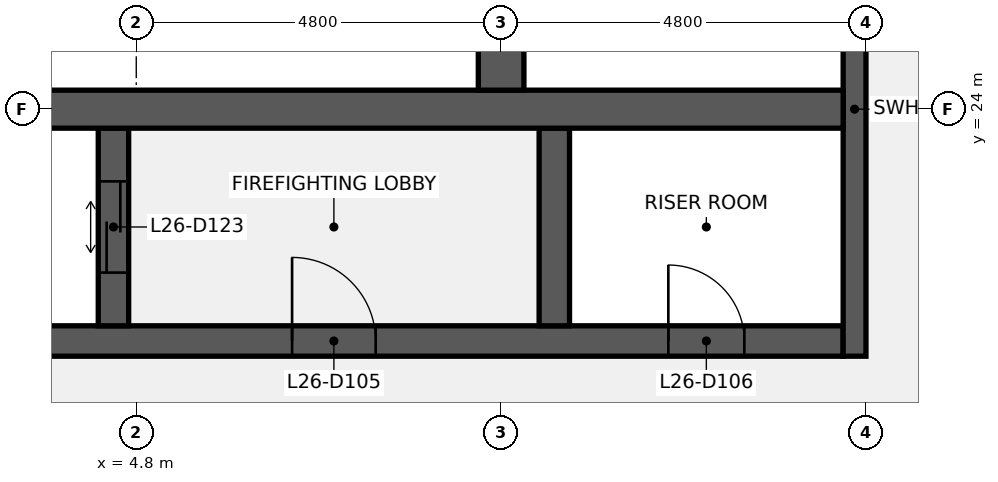
"""IFC4 building model, lengths in metres.
Left out: names, types, materials, properties, quantities, classifications, styles, units other than length and angle.
Written with IfcOpenShell. Run it as: python <this file> out.ifc"""

import sys

from ifc_helpers import new_model, si_unit, direction, frame, frame_2d, origin, place, context, subcontext, project, spatial, rectangle, extrude, element, fill, save


model = new_model("IFC4")
c1 = context("Model", 3, precision=1e-05, world=origin(), true_north=direction((0.0, 1.0)))
c2 = subcontext(c1, "Body", "Model", "MODEL_VIEW")
j1 = project(units=[si_unit("LENGTHUNIT", "METRE"), si_unit("PLANEANGLEUNIT", "RADIAN")], contexts=[c1])
p1 = place(None, origin())
s1 = spatial("IfcSite", under=j1, at=p1, CompositionType="ELEMENT")
p2 = place(p1, origin())
s2 = spatial("IfcBuilding", under=s1, at=p2, CompositionType="ELEMENT")
p3 = place(p2, frame((0.0, 0.0, 124.1)))
s3 = spatial("IfcBuildingStorey", under=s2, at=p3, CompositionType="ELEMENT", Elevation=124.1)
p4 = place(p3, frame((1.0, 20.95, 0.0), z_axis=(0.0, 0.0, 1.0), x_axis=(1.0, 0.0, 0.0)))
e1 = element("IfcWall", 1, at=p4, inside=s3, PredefinedType="SHEAR", context=c2, shape_type="SweptSolid", body=[
    extrude(rectangle(XDim=13.1, YDim=0.4, at=frame_2d((6.55, 0.0))), origin(), (0.0, 0.0, 1.0), 3.84),
])
p5 = place(p4, frame((5.85, 0.0, 0.0)))
e2 = element("IfcOpeningElement", 2, at=p5, cuts=e1, PredefinedType="OPENING", context=c2, shape_type="SweptSolid", body=[
    extrude(rectangle(XDim=1.1, YDim=2.1, at=frame_2d((0.55, 1.05))), frame((0.0, 0.21, 0.0), z_axis=(0.0, -1.0, 0.0), x_axis=(1.0, 0.0, 0.0)), (0.0, 0.0, 1.0), 0.42),
])
p6 = place(p4, frame((10.8, 0.0, 0.0)))
e3 = element("IfcOpeningElement", 3, at=p6, cuts=e1, PredefinedType="OPENING", context=c2, shape_type="SweptSolid", body=[
    extrude(rectangle(XDim=1.0, YDim=2.1, at=frame_2d((0.5, 1.05))), frame((0.0, 0.21, 0.0), z_axis=(0.0, -1.0, 0.0), x_axis=(1.0, 0.0, 0.0)), (0.0, 0.0, 1.0), 0.42),
])
p7 = place(p3, frame((14.25, 20.75, 0.0), z_axis=(0.0, 0.0, 1.0), x_axis=(0.0, 1.0, 0.0)))
e4 = element("IfcWall", 4, at=p7, inside=s3, PredefinedType="SHEAR", context=c2, shape_type="SweptSolid", body=[
    extrude(rectangle(XDim=6.5, YDim=0.3, at=frame_2d((3.25, 0.0))), origin(), (0.0, 0.0, 1.0), 3.84),
])
p8 = place(p3, frame((4.5, 21.15, 0.0), z_axis=(0.0, 0.0, 1.0), x_axis=(0.0, 1.0, 0.0)))
e5 = element("IfcWall", 5, at=p8, inside=s3, PredefinedType="SHEAR", context=c2, shape_type="SweptSolid", body=[
    extrude(rectangle(XDim=2.6, YDim=0.4, at=frame_2d((1.3, 0.0))), origin(), (0.0, 0.0, 1.0), 3.84),
])
p9 = place(p8, frame((0.7, 0.0, 0.0)))
e6 = element("IfcOpeningElement", 6, at=p9, cuts=e5, PredefinedType="OPENING", context=c2, shape_type="SweptSolid", body=[
    extrude(rectangle(XDim=1.2, YDim=2.1, at=frame_2d((0.6, 1.05))), frame((0.0, 0.21, 0.0), z_axis=(0.0, -1.0, 0.0), x_axis=(1.0, 0.0, 0.0)), (0.0, 0.0, 1.0), 0.42),
])
p10 = place(p3, frame((10.3, 21.15, 0.0), z_axis=(0.0, 0.0, 1.0), x_axis=(0.0, 1.0, 0.0)))
e7 = element("IfcWall", 7, at=p10, inside=s3, PredefinedType="SHEAR", context=c2, shape_type="SweptSolid", body=[
    extrude(rectangle(XDim=2.6, YDim=0.4, at=frame_2d((1.3, 0.0))), origin(), (0.0, 0.0, 1.0), 3.84),
])
p11 = place(p3, frame((1.0, 24.0, 0.0), z_axis=(0.0, 0.0, 1.0), x_axis=(1.0, 0.0, 0.0)))
e8 = element("IfcWall", 8, at=p11, inside=s3, PredefinedType="SHEAR", context=c2, shape_type="SweptSolid", body=[
    extrude(rectangle(XDim=13.1, YDim=0.5, at=frame_2d((6.55, 0.0))), origin(), (0.0, 0.0, 1.0), 3.84),
])
p12 = place(p3, frame((9.6, 24.25, 0.0), z_axis=(0.0, 0.0, 1.0), x_axis=(0.0, 1.0, 0.0)))
e9 = element("IfcWall", 9, at=p12, inside=s3, PredefinedType="SHEAR", context=c2, shape_type="SweptSolid", body=[
    extrude(rectangle(XDim=2.6, YDim=0.6, at=frame_2d((1.3, 0.0))), origin(), (0.0, 0.0, 1.0), 3.84),
])
p13 = place(p5, origin())
e10 = element("IfcDoor", 10, at=p13, inside=s3, OperationType="SINGLE_SWING_LEFT", PredefinedType="DOOR", context=c2, shape_type="SweptSolid", body=[
    extrude(rectangle(XDim=1.1, YDim=2.1, at=frame_2d((0.55, 1.05))), frame((0.0, 0.025, 0.0), z_axis=(0.0, -1.0, 0.0), x_axis=(1.0, 0.0, 0.0)), (0.0, 0.0, 1.0), 0.05),
])
fill(e2, e10)
p14 = place(p6, origin())
e11 = element("IfcDoor", 11, at=p14, inside=s3, OperationType="SINGLE_SWING_LEFT", PredefinedType="DOOR", context=c2, shape_type="SweptSolid", body=[
    extrude(rectangle(XDim=1.0, YDim=2.1, at=frame_2d((0.5, 1.05))), frame((0.0, 0.025, 0.0), z_axis=(0.0, -1.0, 0.0), x_axis=(1.0, 0.0, 0.0)), (0.0, 0.0, 1.0), 0.05),
])
fill(e3, e11)
p15 = place(p9, origin())
e12 = element("IfcDoor", 12, at=p15, inside=s3, OperationType="DOUBLE_DOOR_SLIDING", PredefinedType="DOOR", context=c2, shape_type="SweptSolid", body=[
    extrude(rectangle(XDim=1.2, YDim=2.1, at=frame_2d((0.6, 1.05))), frame((0.0, 0.025, 0.0), z_axis=(0.0, -1.0, 0.0), x_axis=(1.0, 0.0, 0.0)), (0.0, 0.0, 1.0), 0.05),
])
fill(e6, e12)
save(model, sys.argv[1])
